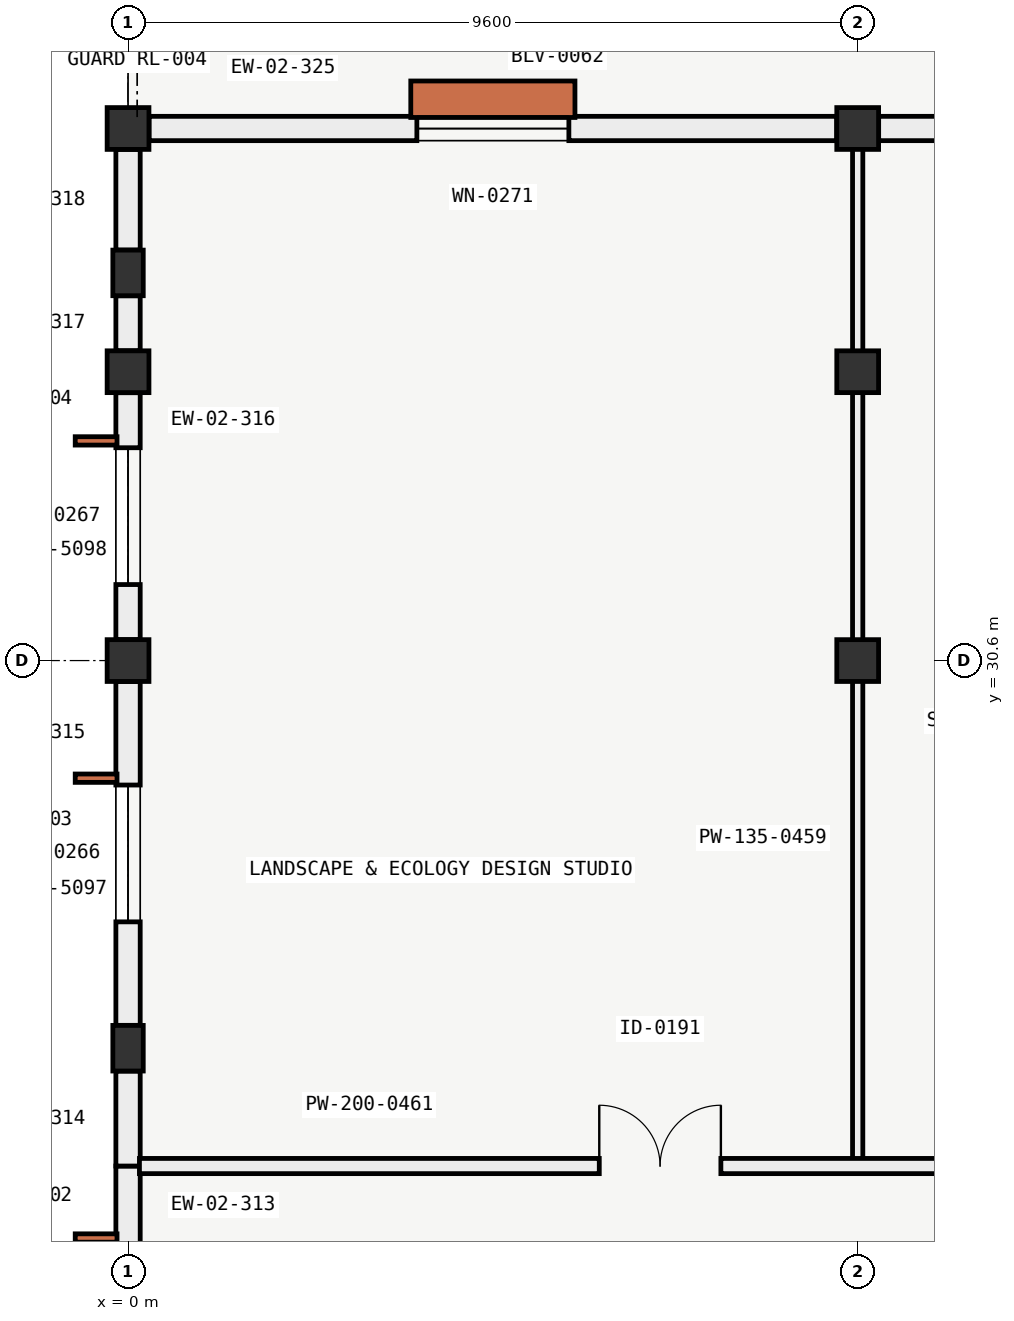
"""IFC4 building model, lengths in metres.
Left out: names, types, materials, properties, quantities, classifications, styles, units other than length and angle.
Written with IfcOpenShell. Run it as: python <this file> out.ifc"""

import sys

from ifc_helpers import new_model, si_unit, direction, frame, frame_2d, origin, origin_2d, place, context, subcontext, project, spatial, rectangle, extrude, element, fill, save


model = new_model("IFC4")
c1 = context("Model", 3, precision=1e-05, world=origin(), true_north=direction((0.0, 1.0)))
c2 = subcontext(c1, "Body", "Model", "MODEL_VIEW")
j1 = project(units=[si_unit("LENGTHUNIT", "METRE"), si_unit("PLANEANGLEUNIT", "RADIAN")], contexts=[c1])
p1 = place(None, origin())
s1 = spatial("IfcSite", under=j1, at=p1, CompositionType="ELEMENT")
p2 = place(p1, origin())
s2 = spatial("IfcBuilding", under=s1, at=p2, CompositionType="ELEMENT")
p3 = place(p2, frame((0.0, 0.0, 22.2)))
s3 = spatial("IfcBuildingStorey", under=s2, at=p3, CompositionType="ELEMENT", Elevation=22.2)
for number, where, z_axis, x_axis in (
    (1, (0.0, 30.6, 0.0), (0.0, 0.0, 1.0), (1.0, 0.0, 0.0)),
    (2, (0.0, 34.4, 0.0), (0.0, 0.0, 1.0), (1.0, 0.0, 0.0)),
    (3, (0.0, 37.6, 0.0), (0.0, 0.0, 1.0), (1.0, 0.0, 0.0)),
    (4, (9.6, 30.6, 0.0), (0.0, 0.0, 1.0), (1.0, 0.0, 0.0)),
    (5, (9.6, 34.4, 0.0), (0.0, 0.0, 1.0), (1.0, 0.0, 0.0)),
    (6, (9.6, 37.6, 0.0), (0.0, 0.0, 1.0), (1.0, 0.0, 0.0)),
):
    element("IfcColumn", number, at=place(p3, frame(where, z_axis=z_axis, x_axis=x_axis)), inside=s3, PredefinedType="COLUMN", context=c2, shape_type="SweptSolid", body=[
        extrude(rectangle(XDim=0.55, YDim=0.55, at=origin_2d()), origin(), (0.0, 0.0, 1.0), 4.2),
    ])
for number, where, z_axis, x_axis in (
    (7, (0.0, 25.5, 0.0), (0.0, 0.0, 1.0), (1.0, 0.0, 0.0)),
    (8, (0.0, 35.7, 0.0), (0.0, 0.0, 1.0), (1.0, 0.0, 0.0)),
):
    element("IfcColumn", number, at=place(p3, frame(where, z_axis=z_axis, x_axis=x_axis)), inside=s3, PredefinedType="PILASTER", context=c2, shape_type="SweptSolid", body=[
        extrude(rectangle(XDim=0.4, YDim=0.6, at=origin_2d()), origin(), (0.0, 0.0, 1.0), 4.2),
    ])
p4 = place(p3, frame((0.0, 20.676, 0.0), z_axis=(0.0, 0.0, 1.0), x_axis=(0.0, 1.0, 0.0)))
e9 = element("IfcWall", 9, at=p4, inside=s3, PredefinedType="SOLIDWALL", context=c2, shape_type="SweptSolid", body=[
    extrude(rectangle(XDim=3.274, YDim=0.32, at=frame_2d((1.637, 0.0))), origin(), (0.0, 0.0, 1.0), 3.3),
])
p5 = place(p4, frame((1.037, 0.0, 0.75)))
e10 = element("IfcOpeningElement", 10, at=p5, cuts=e9, PredefinedType="OPENING", context=c2, shape_type="SweptSolid", body=[
    extrude(rectangle(XDim=1.2, YDim=2.4, at=frame_2d((0.6, 1.2))), frame((0.0, 0.17, 0.0), z_axis=(0.0, -1.0, 0.0), x_axis=(1.0, 0.0, 0.0)), (0.0, 0.0, 1.0), 0.34),
])
p6 = place(p3, frame((0.0, 23.95, 0.0), z_axis=(0.0, 0.0, 1.0), x_axis=(0.0, 1.0, 0.0)))
e11 = element("IfcWall", 11, at=p6, inside=s3, PredefinedType="SOLIDWALL", context=c2, shape_type="SweptSolid", body=[
    extrude(rectangle(XDim=1.249, YDim=0.32, at=frame_2d((0.625, 0.0))), origin(), (0.0, 0.0, 1.0), 3.3),
])
p7 = place(p3, frame((0.0, 25.801, 0.0), z_axis=(0.0, 0.0, 1.0), x_axis=(0.0, 1.0, 0.0)))
e12 = element("IfcWall", 12, at=p7, inside=s3, PredefinedType="SOLIDWALL", context=c2, shape_type="SweptSolid", body=[
    extrude(rectangle(XDim=4.523, YDim=0.32, at=frame_2d((2.261, 0.0))), origin(), (0.0, 0.0, 1.0), 3.3),
])
p8 = place(p7, frame((1.362, 0.0, 0.85)))
e13 = element("IfcOpeningElement", 13, at=p8, cuts=e12, PredefinedType="OPENING", context=c2, shape_type="SweptSolid", body=[
    extrude(rectangle(XDim=1.8, YDim=2.1, at=frame_2d((0.9, 1.05))), frame((0.0, 0.17, 0.0), z_axis=(0.0, -1.0, 0.0), x_axis=(1.0, 0.0, 0.0)), (0.0, 0.0, 1.0), 0.34),
])
p9 = place(p3, frame((0.0, 30.876, 0.0), z_axis=(0.0, 0.0, 1.0), x_axis=(0.0, 1.0, 0.0)))
e14 = element("IfcWall", 14, at=p9, inside=s3, PredefinedType="SOLIDWALL", context=c2, shape_type="SweptSolid", body=[
    extrude(rectangle(XDim=3.248, YDim=0.32, at=frame_2d((1.624, 0.0))), origin(), (0.0, 0.0, 1.0), 3.3),
])
p10 = place(p9, frame((0.724, 0.0, 0.85)))
e15 = element("IfcOpeningElement", 15, at=p10, cuts=e14, PredefinedType="OPENING", context=c2, shape_type="SweptSolid", body=[
    extrude(rectangle(XDim=1.8, YDim=2.1, at=frame_2d((0.9, 1.05))), frame((0.0, 0.17, 0.0), z_axis=(0.0, -1.0, 0.0), x_axis=(1.0, 0.0, 0.0)), (0.0, 0.0, 1.0), 0.34),
])
p11 = place(p3, frame((0.0, 34.676, 0.0), z_axis=(0.0, 0.0, 1.0), x_axis=(0.0, 1.0, 0.0)))
e16 = element("IfcWall", 16, at=p11, inside=s3, PredefinedType="SOLIDWALL", context=c2, shape_type="SweptSolid", body=[
    extrude(rectangle(XDim=0.723, YDim=0.32, at=frame_2d((0.361, 0.0))), origin(), (0.0, 0.0, 1.0), 3.3),
])
p12 = place(p3, frame((0.0, 36.001, 0.0), z_axis=(0.0, 0.0, 1.0), x_axis=(0.0, 1.0, 0.0)))
e17 = element("IfcWall", 17, at=p12, inside=s3, PredefinedType="SOLIDWALL", context=c2, shape_type="SweptSolid", body=[
    extrude(rectangle(XDim=1.323, YDim=0.32, at=frame_2d((0.662, 0.0))), origin(), (0.0, 0.0, 1.0), 3.3),
])
p13 = place(p3, frame((0.276, 37.6, 0.0), z_axis=(0.0, 0.0, 1.0), x_axis=(1.0, 0.0, 0.0)))
e18 = element("IfcWall", 18, at=p13, inside=s3, PredefinedType="SOLIDWALL", context=c2, shape_type="SweptSolid", body=[
    extrude(rectangle(XDim=9.048, YDim=0.32, at=frame_2d((4.524, 0.0))), origin(), (0.0, 0.0, 1.0), 3.3),
])
p14 = place(p13, frame((3.524, 0.0, 0.85)))
e19 = element("IfcOpeningElement", 19, at=p14, cuts=e18, PredefinedType="OPENING", context=c2, shape_type="SweptSolid", body=[
    extrude(rectangle(XDim=2.0, YDim=1.35, at=frame_2d((1.0, 0.675))), frame((0.0, 0.17, 0.0), z_axis=(0.0, -1.0, 0.0), x_axis=(1.0, 0.0, 0.0)), (0.0, 0.0, 1.0), 0.34),
])
p15 = place(p3, frame((9.876, 37.6, 0.0), z_axis=(0.0, 0.0, 1.0), x_axis=(1.0, 0.0, 0.0)))
e20 = element("IfcWall", 20, at=p15, inside=s3, PredefinedType="SOLIDWALL", context=c2, shape_type="SweptSolid", body=[
    extrude(rectangle(XDim=6.299, YDim=0.32, at=frame_2d((3.149, 0.0))), origin(), (0.0, 0.0, 1.0), 3.3),
])
p16 = place(p15, frame((2.149, 0.0, 0.85)))
e21 = element("IfcOpeningElement", 21, at=p16, cuts=e20, PredefinedType="OPENING", context=c2, shape_type="SweptSolid", body=[
    extrude(rectangle(XDim=2.0, YDim=1.35, at=frame_2d((1.0, 0.675))), frame((0.0, 0.17, 0.0), z_axis=(0.0, -1.0, 0.0), x_axis=(1.0, 0.0, 0.0)), (0.0, 0.0, 1.0), 0.34),
])
p17 = place(p3, frame((9.6, 23.95, 0.0), z_axis=(0.0, 0.0, 1.0), x_axis=(0.0, 1.0, 0.0)))
e22 = element("IfcWall", 22, at=p17, inside=s3, PredefinedType="PARTITIONING", context=c2, shape_type="SweptSolid", body=[
    extrude(rectangle(XDim=13.5, YDim=0.135, at=frame_2d((6.75, 0.0))), origin(), (0.0, 0.0, 1.0), 3.305),
])
p18 = place(p3, frame((0.15, 23.95, 0.0), z_axis=(0.0, 0.0, 1.0), x_axis=(1.0, 0.0, 0.0)))
e23 = element("IfcWall", 23, at=p18, inside=s3, PredefinedType="PARTITIONING", context=c2, shape_type="SweptSolid", body=[
    extrude(rectangle(XDim=15.86, YDim=0.2, at=frame_2d((7.93, 0.0))), origin(), (0.0, 0.0, 1.0), 3.305),
])
p19 = place(p18, frame((6.05, 0.0, 0.0)))
e24 = element("IfcOpeningElement", 24, at=p19, cuts=e23, PredefinedType="OPENING", context=c2, shape_type="SweptSolid", body=[
    extrude(rectangle(XDim=1.6, YDim=2.25, at=frame_2d((0.8, 1.125))), frame((0.0, 0.11, 0.0), z_axis=(0.0, -1.0, 0.0), x_axis=(1.0, 0.0, 0.0)), (0.0, 0.0, 1.0), 0.22),
])
p20 = place(p18, frame((13.0, 0.0, 0.0)))
e25 = element("IfcOpeningElement", 25, at=p20, cuts=e23, PredefinedType="OPENING", context=c2, shape_type="SweptSolid", body=[
    extrude(rectangle(XDim=0.92, YDim=2.1, at=frame_2d((0.46, 1.05))), frame((0.0, 0.11, 0.0), z_axis=(0.0, -1.0, 0.0), x_axis=(1.0, 0.0, 0.0)), (0.0, 0.0, 1.0), 0.22),
])
p21 = place(p8, origin())
e26 = element("IfcWindow", 26, at=p21, inside=s3, PartitioningType="SINGLE_PANEL", PredefinedType="WINDOW", context=c2, shape_type="SweptSolid", body=[
    extrude(rectangle(XDim=1.8, YDim=2.1, at=frame_2d((0.9, 1.05))), frame((0.0, 0.03, 0.0), z_axis=(0.0, -1.0, 0.0), x_axis=(1.0, 0.0, 0.0)), (0.0, 0.0, 1.0), 0.06),
])
fill(e13, e26)
p22 = place(p10, origin())
e27 = element("IfcWindow", 27, at=p22, inside=s3, PartitioningType="SINGLE_PANEL", PredefinedType="WINDOW", context=c2, shape_type="SweptSolid", body=[
    extrude(rectangle(XDim=1.8, YDim=2.1, at=frame_2d((0.9, 1.05))), frame((0.0, 0.03, 0.0), z_axis=(0.0, -1.0, 0.0), x_axis=(1.0, 0.0, 0.0)), (0.0, 0.0, 1.0), 0.06),
])
fill(e15, e27)
p23 = place(p14, origin())
e28 = element("IfcWindow", 28, at=p23, inside=s3, PartitioningType="SINGLE_PANEL", PredefinedType="WINDOW", context=c2, shape_type="SweptSolid", body=[
    extrude(rectangle(XDim=2.0, YDim=1.35, at=frame_2d((1.0, 0.675))), frame((0.0, 0.03, 0.0), z_axis=(0.0, -1.0, 0.0), x_axis=(1.0, 0.0, 0.0)), (0.0, 0.0, 1.0), 0.06),
])
fill(e19, e28)
p24 = place(p19, origin())
e29 = element("IfcDoor", 29, at=p24, inside=s3, OperationType="DOUBLE_DOOR_SINGLE_SWING", PredefinedType="DOOR", context=c2, shape_type="SweptSolid", body=[
    extrude(rectangle(XDim=1.6, YDim=2.25, at=frame_2d((0.8, 1.125))), frame((0.0, 0.025, 0.0), z_axis=(0.0, -1.0, 0.0), x_axis=(1.0, 0.0, 0.0)), (0.0, 0.0, 1.0), 0.05),
])
fill(e24, e29)
save(model, sys.argv[1])
